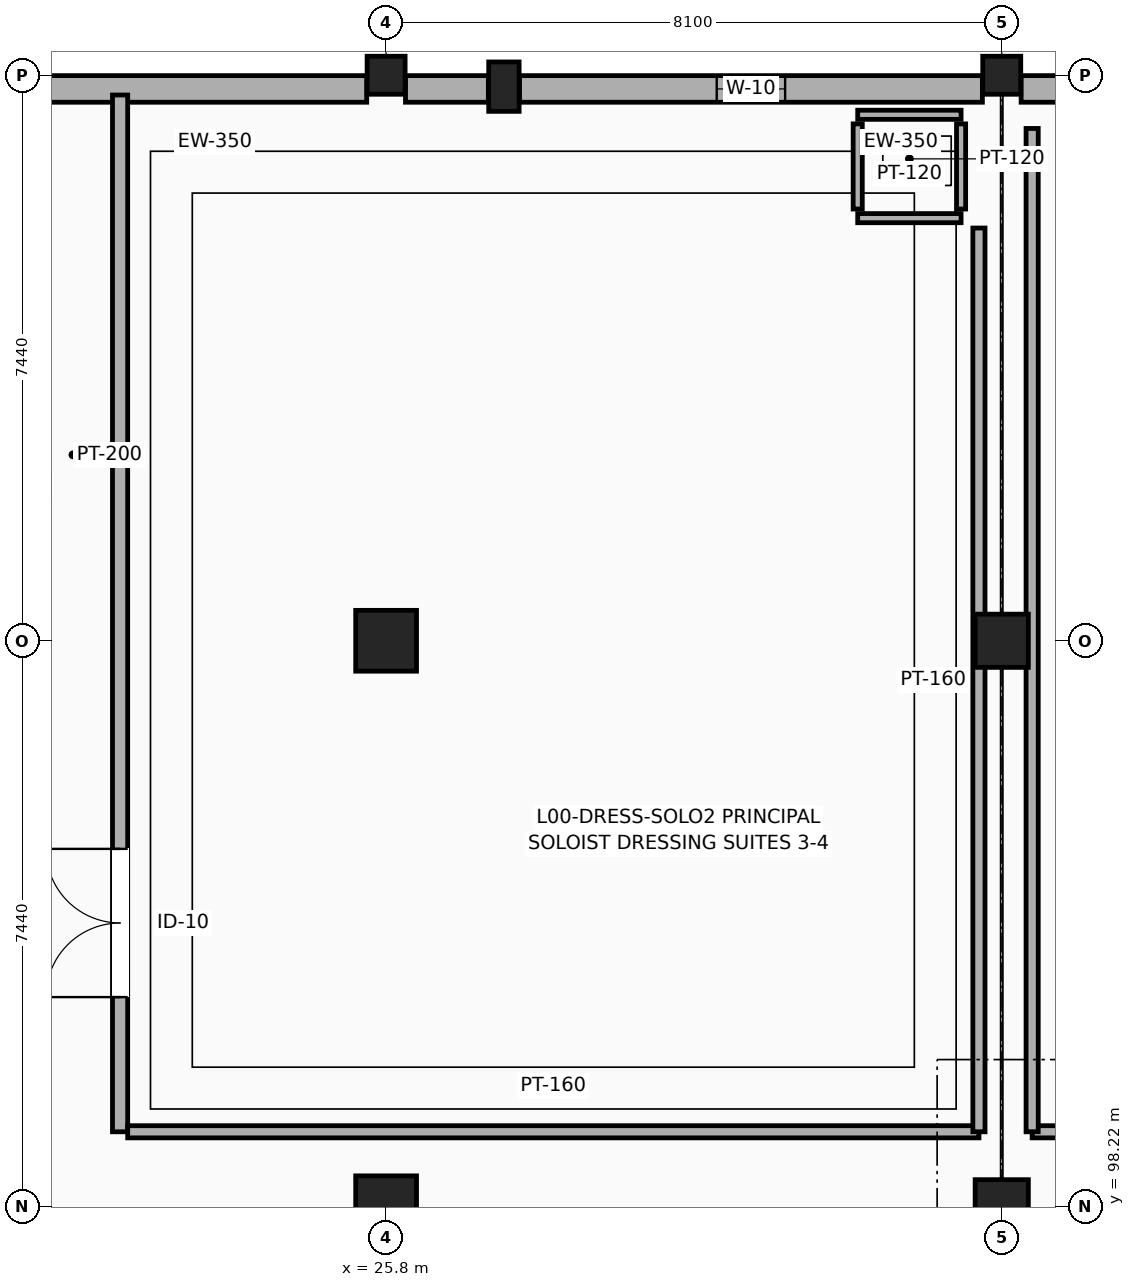
"""IFC4 building model, lengths in metres.
Left out: names, types, materials, properties, quantities, classifications, styles, units other than length and angle.
Written with IfcOpenShell. Run it as: python <this file> out.ifc"""

import sys

from ifc_helpers import new_model, si_unit, direction, frame, frame_2d, origin, origin_2d, place, context, subcontext, project, spatial, rectangle, extrude, element, fill, save


model = new_model("IFC4")
c1 = context("Model", 3, precision=1e-05, world=origin(), true_north=direction((0.0, 1.0)))
c2 = subcontext(c1, "Body", "Model", "MODEL_VIEW")
j1 = project(units=[si_unit("LENGTHUNIT", "METRE"), si_unit("PLANEANGLEUNIT", "RADIAN")], contexts=[c1])
p1 = place(None, origin())
s1 = spatial("IfcSite", under=j1, at=p1, CompositionType="ELEMENT")
p2 = place(p1, origin())
s2 = spatial("IfcBuilding", under=s1, at=p2, CompositionType="ELEMENT")
p3 = place(p2, origin())
s3 = spatial("IfcBuildingStorey", under=s2, at=p3, CompositionType="ELEMENT", Elevation=0.0)
p4 = place(p3, frame((27.35, 112.95, 0.0), z_axis=(0.0, 0.0, 1.0), x_axis=(1.0, 0.0, 0.0)))
e1 = element("IfcColumn", 1, at=p4, inside=s3, PredefinedType="PILASTER", context=c2, shape_type="SweptSolid", body=[
    extrude(rectangle(XDim=0.4, YDim=0.65, at=origin_2d()), origin(), (0.0, 0.0, 1.0), 5.4),
])
for number, where, z_axis, x_axis in (
    (2, (25.8, 98.22, 0.0), (0.0, 0.0, 1.0), (1.0, 0.0, 0.0)),
    (3, (25.8, 105.66, 0.0), (0.0, 0.0, 1.0), (1.0, 0.0, 0.0)),
):
    element("IfcColumn", number, at=place(p3, frame(where, z_axis=z_axis, x_axis=x_axis)), inside=s3, PredefinedType="COLUMN", context=c2, shape_type="SweptSolid", body=[
        extrude(rectangle(XDim=0.8, YDim=0.8, at=origin_2d()), origin(), (0.0, 0.0, 1.0), 5.4),
    ])
p5 = place(p3, frame((25.8, 113.1, 0.0), z_axis=(0.0, 0.0, 1.0), x_axis=(1.0, 0.0, 0.0)))
e4 = element("IfcColumn", 4, at=p5, inside=s3, PredefinedType="COLUMN", context=c2, shape_type="SweptSolid", body=[
    extrude(rectangle(XDim=0.5, YDim=0.5, at=origin_2d()), origin(), (0.0, 0.0, 1.0), 5.4),
])
for number, where, z_axis, x_axis in (
    (5, (33.9, 98.22, 0.0), (0.0, 0.0, 1.0), (1.0, 0.0, 0.0)),
    (6, (33.9, 105.66, 0.0), (0.0, 0.0, 1.0), (1.0, 0.0, 0.0)),
):
    element("IfcColumn", number, at=place(p3, frame(where, z_axis=z_axis, x_axis=x_axis)), inside=s3, PredefinedType="COLUMN", context=c2, shape_type="SweptSolid", body=[
        extrude(rectangle(XDim=0.7, YDim=0.7, at=origin_2d()), origin(), (0.0, 0.0, 1.0), 5.4),
    ])
p6 = place(p3, frame((33.9, 113.1, 0.0), z_axis=(0.0, 0.0, 1.0), x_axis=(1.0, 0.0, 0.0)))
e7 = element("IfcColumn", 7, at=p6, inside=s3, PredefinedType="COLUMN", context=c2, shape_type="SweptSolid", body=[
    extrude(rectangle(XDim=0.5, YDim=0.5, at=origin_2d()), origin(), (0.0, 0.0, 1.0), 5.4),
])
p7 = place(p3, frame((17.955, 112.92, 0.0), z_axis=(0.0, 0.0, 1.0), x_axis=(1.0, 0.0, 0.0)))
e8 = element("IfcWall", 8, at=p7, inside=s3, PredefinedType="SOLIDWALL", context=c2, shape_type="SweptSolid", body=[
    extrude(rectangle(XDim=7.59, YDim=0.35, at=frame_2d((3.795, 0.0))), origin(), (0.0, 0.0, 1.0), 4.137),
])
p8 = place(p7, frame((1.345, 0.0, 0.0)))
e9 = element("IfcOpeningElement", 9, at=p8, cuts=e8, PredefinedType="OPENING", context=c2, shape_type="SweptSolid", body=[
    extrude(rectangle(XDim=1.8, YDim=2.4, at=frame_2d((0.9, 1.2))), frame((0.0, 0.185, 0.0), z_axis=(0.0, -1.0, 0.0), x_axis=(1.0, 0.0, 0.0)), (0.0, 0.0, 1.0), 0.37),
])
p9 = place(p3, frame((27.555, 112.92, 0.0), z_axis=(0.0, 0.0, 1.0), x_axis=(1.0, 0.0, 0.0)))
e10 = element("IfcWall", 10, at=p9, inside=s3, PredefinedType="SOLIDWALL", context=c2, shape_type="SweptSolid", body=[
    extrude(rectangle(XDim=6.09, YDim=0.35, at=frame_2d((3.045, 0.0))), origin(), (0.0, 0.0, 1.0), 4.137),
])
p10 = place(p9, frame((2.595, 0.0, 0.9)))
e11 = element("IfcOpeningElement", 11, at=p10, cuts=e10, PredefinedType="OPENING", context=c2, shape_type="SweptSolid", body=[
    extrude(rectangle(XDim=0.9, YDim=2.1, at=frame_2d((0.45, 1.05))), frame((0.0, 0.185, 0.0), z_axis=(0.0, -1.0, 0.0), x_axis=(1.0, 0.0, 0.0)), (0.0, 0.0, 1.0), 0.37),
])
p11 = place(p3, frame((26.055, 112.92, 0.0), z_axis=(0.0, 0.0, 1.0), x_axis=(1.0, 0.0, 0.0)))
e12 = element("IfcWall", 12, at=p11, inside=s3, PredefinedType="SOLIDWALL", context=c2, shape_type="SweptSolid", body=[
    extrude(rectangle(XDim=1.09, YDim=0.35, at=frame_2d((0.545, 0.0))), origin(), (0.0, 0.0, 1.0), 4.137),
])
p12 = place(p3, frame((34.155, 112.92, 0.0), z_axis=(0.0, 0.0, 1.0), x_axis=(1.0, 0.0, 0.0)))
e13 = element("IfcWall", 13, at=p12, inside=s3, PredefinedType="SOLIDWALL", context=c2, shape_type="SweptSolid", body=[
    extrude(rectangle(XDim=1.065, YDim=0.35, at=frame_2d((0.532, 0.0))), origin(), (0.0, 0.0, 1.0), 4.137),
])
for number, where, z_axis, x_axis in (
    (14, (32.005, 111.22, 0.0), (0.0, 0.0, 1.0), (1.0, 0.0, 0.0)),
    (15, (32.005, 112.58, 0.0), (0.0, 0.0, 1.0), (1.0, 0.0, 0.0)),
):
    element("IfcWall", number, at=place(p3, frame(where, z_axis=z_axis, x_axis=x_axis)), inside=s3, PredefinedType="PARTITIONING", context=c2, shape_type="SweptSolid", body=[
        extrude(rectangle(XDim=1.36, YDim=0.12, at=frame_2d((0.68, 0.0))), origin(), (0.0, 0.0, 1.0), 5.085),
    ])
for number, where, z_axis, x_axis in (
    (16, (32.005, 111.34, 0.0), (0.0, 0.0, 1.0), (0.0, 1.0, 0.0)),
    (17, (33.365, 111.34, 0.0), (0.0, 0.0, 1.0), (0.0, 1.0, 0.0)),
):
    element("IfcWall", number, at=place(p3, frame(where, z_axis=z_axis, x_axis=x_axis)), inside=s3, PredefinedType="PARTITIONING", context=c2, shape_type="SweptSolid", body=[
        extrude(rectangle(XDim=1.12, YDim=0.12, at=frame_2d((0.56, 0.0))), origin(), (0.0, 0.0, 1.0), 5.085),
    ])
p13 = place(p3, frame((22.3, 99.2, 0.0), z_axis=(0.0, 0.0, 1.0), x_axis=(0.0, 1.0, 0.0)))
e18 = element("IfcWall", 18, at=p13, inside=s3, PredefinedType="PARTITIONING", context=c2, shape_type="SweptSolid", body=[
    extrude(rectangle(XDim=13.64, YDim=0.2, at=frame_2d((6.82, 0.0))), origin(), (0.0, 0.0, 1.0), 4.137),
])
p14 = place(p13, frame((1.772, 0.0, 0.0)))
e19 = element("IfcOpeningElement", 19, at=p14, cuts=e18, PredefinedType="OPENING", context=c2, shape_type="SweptSolid", body=[
    extrude(rectangle(XDim=1.95, YDim=2.45, at=frame_2d((0.975, 1.225))), frame((0.0, 0.11, 0.0), z_axis=(0.0, -1.0, 0.0), x_axis=(1.0, 0.0, 0.0)), (0.0, 0.0, 1.0), 0.22),
])
p15 = place(p3, frame((22.4, 99.2, 0.0), z_axis=(0.0, 0.0, 1.0), x_axis=(1.0, 0.0, 0.0)))
e20 = element("IfcWall", 20, at=p15, inside=s3, PredefinedType="PARTITIONING", context=c2, shape_type="SweptSolid", body=[
    extrude(rectangle(XDim=11.2, YDim=0.16, at=frame_2d((5.6, 0.0))), origin(), (0.0, 0.0, 1.0), 4.337),
])
p16 = place(p3, frame((33.6, 99.2, 0.0), z_axis=(0.0, 0.0, 1.0), x_axis=(0.0, 1.0, 0.0)))
e21 = element("IfcWall", 21, at=p16, inside=s3, PredefinedType="PARTITIONING", context=c2, shape_type="SweptSolid", body=[
    extrude(rectangle(XDim=11.89, YDim=0.16, at=frame_2d((5.945, 0.0))), origin(), (0.0, 0.0, 1.0), 4.137),
])
p17 = place(p3, frame((34.3, 99.2, 0.0), z_axis=(0.0, 0.0, 1.0), x_axis=(1.0, 0.0, 0.0)))
e22 = element("IfcWall", 22, at=p17, inside=s3, PredefinedType="PARTITIONING", context=c2, shape_type="SweptSolid", body=[
    extrude(rectangle(XDim=7.9, YDim=0.16, at=frame_2d((3.95, 0.0))), origin(), (0.0, 0.0, 1.0), 4.337),
])
p18 = place(p3, frame((34.3, 99.2, 0.0), z_axis=(0.0, 0.0, 1.0), x_axis=(0.0, 1.0, 0.0)))
e23 = element("IfcWall", 23, at=p18, inside=s3, PredefinedType="PARTITIONING", context=c2, shape_type="SweptSolid", body=[
    extrude(rectangle(XDim=13.2, YDim=0.16, at=frame_2d((6.6, 0.0))), origin(), (0.0, 0.0, 1.0), 4.137),
])
p19 = place(p10, origin())
e24 = element("IfcWindow", 24, at=p19, inside=s3, PartitioningType="SINGLE_PANEL", PredefinedType="WINDOW", context=c2, shape_type="SweptSolid", body=[
    extrude(rectangle(XDim=0.9, YDim=2.1, at=frame_2d((0.45, 1.05))), frame((0.0, 0.03, 0.0), z_axis=(0.0, -1.0, 0.0), x_axis=(1.0, 0.0, 0.0)), (0.0, 0.0, 1.0), 0.06),
])
fill(e11, e24)
p20 = place(p14, origin())
e25 = element("IfcDoor", 25, at=p20, inside=s3, OperationType="DOUBLE_DOOR_SINGLE_SWING", PredefinedType="DOOR", context=c2, shape_type="SweptSolid", body=[
    extrude(rectangle(XDim=1.95, YDim=2.45, at=frame_2d((0.975, 1.225))), frame((0.0, 0.025, 0.0), z_axis=(0.0, -1.0, 0.0), x_axis=(1.0, 0.0, 0.0)), (0.0, 0.0, 1.0), 0.05),
])
fill(e19, e25)
save(model, sys.argv[1])
